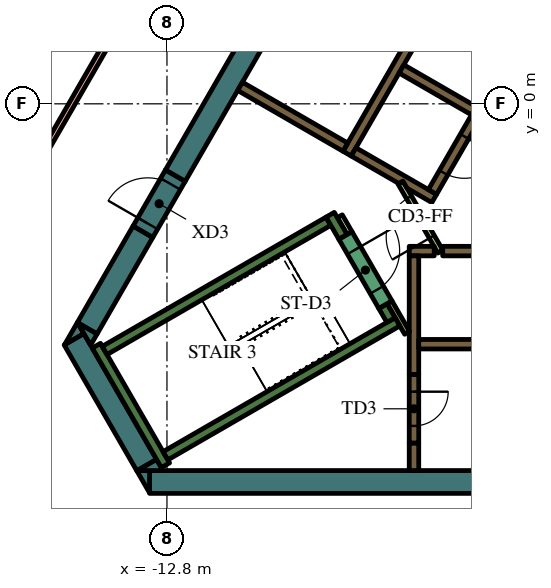
"""IFC4 building model, lengths in metres.
Left out: names, types, materials, properties, quantities, classifications, styles, units other than length and angle.
Written with IfcOpenShell. Run it as: python <this file> out.ifc"""

import sys

from ifc_helpers import new_model, si_unit, direction, frame, frame_2d, origin, place, context, subcontext, project, spatial, polyline, rectangle, outline, extrude, element, fill, save


model = new_model("IFC4")
c1 = context("Model", 3, precision=1e-05, world=origin(), true_north=direction((0.0, 1.0)))
c2 = subcontext(c1, "Body", "Model", "MODEL_VIEW")
j1 = project(units=[si_unit("LENGTHUNIT", "METRE"), si_unit("PLANEANGLEUNIT", "RADIAN")], contexts=[c1])
p1 = place(None, origin())
s1 = spatial("IfcSite", under=j1, at=p1, CompositionType="ELEMENT")
p2 = place(p1, origin())
s2 = spatial("IfcBuilding", under=s1, at=p2, CompositionType="ELEMENT")
p3 = place(p2, frame((0.0, 0.0, 321.6)))
s3 = spatial("IfcBuildingStorey", under=s2, at=p3, CompositionType="ELEMENT", Elevation=321.6)
p4 = place(p3, frame((8.904, -9.95, 0.0), z_axis=(0.0, 0.0, 1.0), x_axis=(-1.0, 0.0, 0.0)))
e1 = element("IfcWall", 1, at=p4, inside=s3, PredefinedType="SOLIDWALL", context=c2, shape_type="SweptSolid", body=[
    extrude(rectangle(XDim=22.161, YDim=0.6, at=frame_2d((11.081, 0.0))), origin(), (0.0, 0.0, 1.0), 6.0),
])
p5 = place(p3, origin())
e2 = element("IfcWall", 2, at=p5, inside=s3, PredefinedType="SOLIDWALL", context=c2, shape_type="SweptSolid", body=[
    extrude(outline(polyline([(-13.597, -9.65), (-13.259, -9.65), (-13.259, -10.236), (-13.597, -9.65)])), origin(), (0.0, 0.0, 1.0), 6.0),
])
p6 = place(p3, frame((-13.333, -9.506, 0.0), z_axis=(0.0, 0.0, 1.0), x_axis=(-0.500019073792, 0.866014391245, 0.0)))
e3 = element("IfcWall", 3, at=p6, inside=s3, PredefinedType="SOLIDWALL", context=c2, shape_type="SweptSolid", body=[
    extrude(rectangle(XDim=3.823, YDim=0.6, at=frame_2d((1.912, 0.0))), origin(), (0.0, 0.0, 1.0), 6.0),
])
e4 = element("IfcWall", 4, at=p5, inside=s3, PredefinedType="SOLIDWALL", context=c2, shape_type="SweptSolid", body=[
    extrude(outline(polyline([(-14.987, -6.043), (-15.493, -6.335), (-15.156, -5.75), (-14.987, -6.043)])), origin(), (0.0, 0.0, 1.0), 6.0),
])
e5 = element("IfcWall", 5, at=p5, inside=s3, PredefinedType="SOLIDWALL", context=c2, shape_type="SweptSolid", body=[
    extrude(outline(polyline([(-12.904, -9.65), (-13.58, -9.65), (-13.073, -9.357), (-12.904, -9.65)])), origin(), (0.0, 0.0, 1.0), 6.0),
])
p7 = place(p3, frame((-13.432, -3.364, 0.0), z_axis=(0.0, 0.0, 1.0), x_axis=(-0.499960127962, -0.866048422692, 0.0)))
e6 = element("IfcWall", 6, at=p7, inside=s3, PredefinedType="SOLIDWALL", context=c2, shape_type="SweptSolid", body=[
    extrude(rectangle(XDim=2.934, YDim=0.6, at=frame_2d((1.467, 0.0))), origin(), (0.0, 0.0, 1.0), 6.0),
])
e7 = element("IfcWall", 7, at=p5, inside=s3, PredefinedType="SOLIDWALL", context=c2, shape_type="SweptSolid", body=[
    extrude(outline(polyline([(-14.809, -6.35), (-15.147, -5.764), (-14.64, -6.057), (-14.809, -6.35)])), origin(), (0.0, 0.0, 1.0), 6.0),
])
p8 = place(p3, frame((-4.652, 11.842, 0.0), z_axis=(0.0, 0.0, 1.0), x_axis=(-0.500003640647, -0.866023301845, 0.0)))
e8 = element("IfcWall", 8, at=p8, inside=s3, PredefinedType="SOLIDWALL", context=c2, shape_type="SweptSolid", body=[
    extrude(rectangle(XDim=15.858, YDim=0.6, at=frame_2d((7.929, 0.0))), origin(), (0.0, 0.0, 1.0), 6.0),
])
p9 = place(p3, frame((-12.84, -9.511, 0.0), z_axis=(0.0, 0.0, 1.0), x_axis=(-0.499997733992, 0.866026712061, 0.0)))
e9 = element("IfcWall", 9, at=p9, inside=s3, PredefinedType="SOLIDWALL", context=c2, shape_type="SweptSolid", body=[
    extrude(rectangle(XDim=3.634, YDim=0.25, at=frame_2d((1.817, 0.0))), origin(), (0.0, 0.0, 1.0), 6.0),
])
p10 = place(p3, frame((-14.44, -6.49, 0.0), z_axis=(0.0, 0.0, 1.0), x_axis=(0.866022966069, 0.500004222222, 0.0)))
e10 = element("IfcWall", 10, at=p10, inside=s3, PredefinedType="SOLIDWALL", context=c2, shape_type="SweptSolid", body=[
    extrude(rectangle(XDim=6.8, YDim=0.25, at=frame_2d((3.4, 0.0))), origin(), (0.0, 0.0, 1.0), 6.0),
])
p11 = place(p3, frame((-8.168, -3.503, 0.0), z_axis=(0.0, 0.0, 1.0), x_axis=(-0.499952099219, 0.866053057547, 0.0)))
e11 = element("IfcWall", 11, at=p11, inside=s3, PredefinedType="SOLIDWALL", context=c2, shape_type="SweptSolid", body=[
    extrude(rectangle(XDim=0.675, YDim=0.25, at=frame_2d((0.337, 0.0))), origin(), (0.0, 0.0, 1.0), 6.0),
])
p12 = place(p3, frame((-12.84, -9.261, 0.0), z_axis=(0.0, 0.0, 1.0), x_axis=(0.866016039709, 0.500016218704, 0.0)))
e12 = element("IfcWall", 12, at=p12, inside=s3, PredefinedType="SOLIDWALL", context=c2, shape_type="SweptSolid", body=[
    extrude(rectangle(XDim=7.05, YDim=0.25, at=frame_2d((3.525, 0.0))), origin(), (0.0, 0.0, 1.0), 6.0),
])
p13 = place(p3, frame((-6.905, -5.69, 0.0), z_axis=(0.0, 0.0, 1.0), x_axis=(-0.500402024738, 0.865793170242, 0.0)))
e13 = element("IfcWall", 13, at=p13, inside=s3, PredefinedType="SOLIDWALL", context=c2, shape_type="SweptSolid", body=[
    extrude(rectangle(XDim=0.425, YDim=0.25, at=frame_2d((0.212, 0.0))), origin(), (0.0, 0.0, 1.0), 6.0),
])
p14 = place(p3, frame((-5.545, -3.875, 0.0), z_axis=(0.0, 0.0, 1.0), x_axis=(1.0, 0.0, 0.0)))
e14 = element("IfcWall", 14, at=p14, inside=s3, PredefinedType="SOLIDWALL", context=c2, shape_type="SweptSolid", body=[
    extrude(rectangle(XDim=11.97, YDim=0.25, at=frame_2d((5.985, 0.0))), origin(), (0.0, 0.0, 1.0), 6.0),
])
p15 = place(p3, frame((-6.425, -3.875, 0.0), z_axis=(0.0, 0.0, 1.0), x_axis=(1.0, 0.0, 0.0)))
e15 = element("IfcWall", 15, at=p15, inside=s3, PredefinedType="SOLIDWALL", context=c2, shape_type="SweptSolid", body=[
    extrude(rectangle(XDim=0.658, YDim=0.25, at=frame_2d((0.329, 0.0))), origin(), (0.0, 0.0, 1.0), 6.0),
])
p16 = place(p3, frame((-6.3, -7.125, 0.0), z_axis=(0.0, 0.0, 1.0), x_axis=(0.0, 1.0, 0.0)))
e16 = element("IfcWall", 16, at=p16, inside=s3, PredefinedType="SOLIDWALL", context=c2, shape_type="SweptSolid", body=[
    extrude(rectangle(XDim=3.125, YDim=0.25, at=frame_2d((1.562, 0.0))), origin(), (0.0, 0.0, 1.0), 6.0),
])
p17 = place(p3, frame((-6.3, -8.925, 0.0), z_axis=(0.0, 0.0, 1.0), x_axis=(0.0, -1.0, 0.0)))
e17 = element("IfcWall", 17, at=p17, inside=s3, PredefinedType="SOLIDWALL", context=c2, shape_type="SweptSolid", body=[
    extrude(rectangle(XDim=0.725, YDim=0.25, at=frame_2d((0.363, 0.0))), origin(), (0.0, 0.0, 1.0), 6.0),
])
p18 = place(p3, frame((-8.06, -1.311, 0.0), z_axis=(0.0, 0.0, 1.0), x_axis=(0.50000273126, 0.866023826885, 0.0)))
e18 = element("IfcWall", 18, at=p18, inside=s3, PredefinedType="SOLIDWALL", context=c2, shape_type="SweptSolid", body=[
    extrude(rectangle(XDim=10.33, YDim=0.25, at=frame_2d((5.165, 0.0))), origin(), (0.0, 0.0, 1.0), 6.0),
])
p19 = place(p3, frame((-4.724, -0.182, 0.0), z_axis=(0.0, 0.0, 1.0), x_axis=(-0.866008176907, 0.50002983664, 0.0)))
e19 = element("IfcWall", 19, at=p19, inside=s3, PredefinedType="SOLIDWALL", context=c2, shape_type="SweptSolid", body=[
    extrude(rectangle(XDim=2.2, YDim=0.25, at=frame_2d((1.1, 0.0))), origin(), (0.0, 0.0, 1.0), 6.0),
])
e20 = element("IfcWall", 20, at=p5, inside=s3, PredefinedType="SOLIDWALL", context=c2, shape_type="SweptSolid", body=[
    extrude(outline(polyline([(-5.922, -2.257), (-5.922, -2.257), (-5.705, -2.382), (-5.83, -2.598), (-6.483, -2.221), (-6.591, -2.033), (-6.591, -2.033), (-6.7, -2.096), (-7.952, -1.373), (-7.827, -1.156), (-5.922, -2.257)])), origin(), (0.0, 0.0, 1.0), 6.0),
])
p20 = place(p3, frame((-8.106, -1.14, 0.0), z_axis=(0.0, 0.0, 1.0), x_axis=(-0.866008981251, 0.500028443584, 0.0)))
e21 = element("IfcWall", 21, at=p20, inside=s3, PredefinedType="SOLIDWALL", context=c2, shape_type="SweptSolid", body=[
    extrude(rectangle(XDim=3.2, YDim=0.25, at=frame_2d((1.6, 0.0))), origin(), (0.0, 0.0, 1.0), 6.0),
])
p21 = place(p3, frame((-8.252, -2.958, 0.0), z_axis=(0.0, 0.0, 1.0), x_axis=(0.500174715838, -0.865924508047, 0.0)))
e22 = element("IfcWall", 22, at=p21, inside=s3, PredefinedType="PARTITIONING", context=c2, shape_type="SweptSolid", body=[
    extrude(rectangle(XDim=0.514, YDim=0.15, at=frame_2d((0.257, 0.0))), origin(), (0.0, 0.0, 1.0), 5.3),
])
p22 = place(p3, frame((-6.48, -6.027, 0.0), z_axis=(0.0, 0.0, 1.0), x_axis=(-0.499927229454, 0.866067413802, 0.0)))
e23 = element("IfcWall", 23, at=p22, inside=s3, PredefinedType="PARTITIONING", context=c2, shape_type="SweptSolid", body=[
    extrude(rectangle(XDim=0.929, YDim=0.15, at=frame_2d((0.464, 0.0))), origin(), (0.0, 0.0, 1.0), 6.0),
])
p23 = place(p3, frame((-6.175, -6.325, 0.0), z_axis=(0.0, 0.0, 1.0), x_axis=(1.0, 0.0, 0.0)))
e24 = element("IfcWall", 24, at=p23, inside=s3, PredefinedType="SOLIDWALL", context=c2, shape_type="SweptSolid", body=[
    extrude(rectangle(XDim=12.35, YDim=0.25, at=frame_2d((6.175, 0.0))), origin(), (0.0, 0.0, 1.0), 6.0),
])
p24 = place(p23, frame((3.205, 0.0, 0.0)))
e25 = element("IfcOpeningElement", 25, at=p24, cuts=e24, PredefinedType="OPENING", context=c2, shape_type="SweptSolid", body=[
    extrude(rectangle(XDim=0.9, YDim=2.1, at=frame_2d((0.45, 1.05))), frame((0.0, 0.135, 0.0), z_axis=(0.0, -1.0, 0.0), x_axis=(1.0, 0.0, 0.0)), (0.0, 0.0, 1.0), 0.27),
])
p25 = place(p23, frame((8.145, 0.0, 0.0)))
e26 = element("IfcOpeningElement", 26, at=p25, cuts=e24, PredefinedType="OPENING", context=c2, shape_type="SweptSolid", body=[
    extrude(rectangle(XDim=1.1, YDim=2.1, at=frame_2d((0.55, 1.05))), frame((0.0, 0.135, 0.0), z_axis=(0.0, -1.0, 0.0), x_axis=(1.0, 0.0, 0.0)), (0.0, 0.0, 1.0), 0.27),
])
p26 = place(p23, frame((10.665, 0.0, 0.0)))
e27 = element("IfcOpeningElement", 27, at=p26, cuts=e24, PredefinedType="OPENING", context=c2, shape_type="SweptSolid", body=[
    extrude(rectangle(XDim=1.1, YDim=2.1, at=frame_2d((0.55, 1.05))), frame((0.0, 0.135, 0.0), z_axis=(0.0, -1.0, 0.0), x_axis=(1.0, 0.0, 0.0)), (0.0, 0.0, 1.0), 0.27),
])
p27 = place(p3, frame((-0.898, 6.194, 0.0), z_axis=(0.0, 0.0, 1.0), x_axis=(-0.499996202215, -0.866027596426, 0.0)))
e28 = element("IfcWall", 28, at=p27, inside=s3, PredefinedType="SOLIDWALL", context=c2, shape_type="SweptSolid", body=[
    extrude(rectangle(XDim=9.83, YDim=0.25, at=frame_2d((4.915, 0.0))), origin(), (0.0, 0.0, 1.0), 6.0),
])
p28 = place(p27, frame((0.585, 0.0, 0.0)))
e29 = element("IfcOpeningElement", 29, at=p28, cuts=e28, PredefinedType="OPENING", context=c2, shape_type="SweptSolid", body=[
    extrude(rectangle(XDim=1.1, YDim=2.1, at=frame_2d((0.55, 1.05))), frame((0.0, 0.135, 0.0), z_axis=(0.0, -1.0, 0.0), x_axis=(1.0, 0.0, 0.0)), (0.0, 0.0, 1.0), 0.27),
])
p29 = place(p27, frame((3.105, 0.0, 0.0)))
e30 = element("IfcOpeningElement", 30, at=p29, cuts=e28, PredefinedType="OPENING", context=c2, shape_type="SweptSolid", body=[
    extrude(rectangle(XDim=1.1, YDim=2.1, at=frame_2d((0.55, 1.05))), frame((0.0, 0.135, 0.0), z_axis=(0.0, -1.0, 0.0), x_axis=(1.0, 0.0, 0.0)), (0.0, 0.0, 1.0), 0.27),
])
p30 = place(p27, frame((5.625, 0.0, 0.0)))
e31 = element("IfcOpeningElement", 31, at=p30, cuts=e28, PredefinedType="OPENING", context=c2, shape_type="SweptSolid", body=[
    extrude(rectangle(XDim=1.1, YDim=2.1, at=frame_2d((0.55, 1.05))), frame((0.0, 0.135, 0.0), z_axis=(0.0, -1.0, 0.0), x_axis=(1.0, 0.0, 0.0)), (0.0, 0.0, 1.0), 0.27),
])
p31 = place(p27, frame((8.145, 0.0, 0.0)))
e32 = element("IfcOpeningElement", 32, at=p31, cuts=e28, PredefinedType="OPENING", context=c2, shape_type="SweptSolid", body=[
    extrude(rectangle(XDim=1.1, YDim=2.1, at=frame_2d((0.55, 1.05))), frame((0.0, 0.135, 0.0), z_axis=(0.0, -1.0, 0.0), x_axis=(1.0, 0.0, 0.0)), (0.0, 0.0, 1.0), 0.27),
])
p32 = place(p3, frame((-8.103, -3.466, 0.0), z_axis=(0.0, 0.0, 1.0), x_axis=(0.500078061341, -0.865980330357, 0.0)))
e33 = element("IfcWall", 33, at=p32, inside=s3, PredefinedType="SOLIDWALL", context=c2, shape_type="SweptSolid", body=[
    extrude(rectangle(XDim=2.1, YDim=0.4, at=frame_2d((1.05, 0.0))), origin(), (0.0, 0.0, 1.0), 6.0),
])
p33 = place(p32, frame((0.45, 0.0, 0.0)))
e34 = element("IfcOpeningElement", 34, at=p33, cuts=e33, PredefinedType="OPENING", context=c2, shape_type="SweptSolid", body=[
    extrude(rectangle(XDim=1.2, YDim=2.1, at=frame_2d((0.6, 1.05))), frame((0.0, 0.21, 0.0), z_axis=(0.0, -1.0, 0.0), x_axis=(1.0, 0.0, 0.0)), (0.0, 0.0, 1.0), 0.42),
])
p34 = place(p3, frame((-6.3, -7.125, 0.0), z_axis=(0.0, 0.0, 1.0), x_axis=(0.0, -1.0, 0.0)))
e35 = element("IfcWall", 35, at=p34, inside=s3, PredefinedType="SOLIDWALL", context=c2, shape_type="SweptSolid", body=[
    extrude(rectangle(XDim=1.8, YDim=0.25, at=frame_2d((0.9, 0.0))), origin(), (0.0, 0.0, 1.0), 6.0),
])
p35 = place(p34, frame((0.45, 0.0, 0.0)))
e36 = element("IfcOpeningElement", 36, at=p35, cuts=e35, PredefinedType="OPENING", context=c2, shape_type="SweptSolid", body=[
    extrude(rectangle(XDim=0.9, YDim=2.1, at=frame_2d((0.45, 1.05))), frame((0.0, 0.135, 0.0), z_axis=(0.0, -1.0, 0.0), x_axis=(1.0, 0.0, 0.0)), (0.0, 0.0, 1.0), 0.27),
])
p36 = place(p3, frame((-5.606, -3.89, 0.0), z_axis=(0.0, 0.0, 1.0), x_axis=(-0.500027713859, 0.866009402589, 0.0)))
e37 = element("IfcWall", 37, at=p36, inside=s3, PredefinedType="PARTITIONING", context=c2, shape_type="SweptSolid", body=[
    extrude(rectangle(XDim=2.1, YDim=0.15, at=frame_2d((1.05, 0.0))), origin(), (0.0, 0.0, 1.0), 5.3),
])
p37 = place(p36, frame((0.45, 0.0, 0.0)))
e38 = element("IfcOpeningElement", 38, at=p37, cuts=e37, PredefinedType="OPENING", context=c2, shape_type="SweptSolid", body=[
    extrude(rectangle(XDim=1.2, YDim=2.1, at=frame_2d((0.6, 1.05))), frame((0.0, 0.085, 0.0), z_axis=(0.0, -1.0, 0.0), x_axis=(1.0, 0.0, 0.0)), (0.0, 0.0, 1.0), 0.17),
])
p38 = place(p3, frame((-13.432, -3.364, 0.0), z_axis=(0.0, 0.0, 1.0), x_axis=(0.500000056704, 0.866025371046, 0.0)))
e39 = element("IfcWall", 39, at=p38, inside=s3, PredefinedType="SOLIDWALL", context=c2, shape_type="SweptSolid", body=[
    extrude(rectangle(XDim=1.7, YDim=0.6, at=frame_2d((0.85, 0.0))), origin(), (0.0, 0.0, 1.0), 6.0),
])
p39 = place(p38, frame((0.25, 0.0, 0.0)))
e40 = element("IfcOpeningElement", 40, at=p39, cuts=e39, PredefinedType="OPENING", context=c2, shape_type="SweptSolid", body=[
    extrude(rectangle(XDim=1.2, YDim=2.1, at=frame_2d((0.6, 1.05))), frame((0.0, 0.31, 0.0), z_axis=(0.0, -1.0, 0.0), x_axis=(1.0, 0.0, 0.0)), (0.0, 0.0, 1.0), 0.62),
])
p40 = place(p3, frame((-3.984, 19.6, 0.0), z_axis=(0.0, 0.0, 1.0), x_axis=(-0.500001742692, -0.866024397638, 0.0)))
e41 = element("IfcWall", 41, at=p40, inside=s3, PredefinedType="PARTITIONING", context=c2, shape_type="SweptSolid", body=[
    extrude(rectangle(XDim=29.965, YDim=0.15, at=frame_2d((14.982, 0.0))), origin(), (0.0, 0.0, 1.0), 5.3),
])
p41 = place(p40, frame((14.082, 0.0, 0.0)))
e42 = element("IfcOpeningElement", 42, at=p41, cuts=e41, PredefinedType="OPENING", context=c2, shape_type="SweptSolid", body=[
    extrude(rectangle(XDim=1.8, YDim=2.1, at=frame_2d((0.9, 1.05))), frame((0.0, 0.085, 0.0), z_axis=(0.0, -1.0, 0.0), x_axis=(1.0, 0.0, 0.0)), (0.0, 0.0, 1.0), 0.17),
])
p42 = place(p40, frame((9.894, 0.0, 0.0)))
e43 = element("IfcOpeningElement", 43, at=p42, cuts=e41, PredefinedType="OPENING", context=c2, shape_type="SweptSolid", body=[
    extrude(rectangle(XDim=1.8, YDim=2.1, at=frame_2d((0.9, 1.05))), frame((0.0, 0.085, 0.0), z_axis=(0.0, -1.0, 0.0), x_axis=(1.0, 0.0, 0.0)), (0.0, 0.0, 1.0), 0.17),
])
p43 = place(p31, origin())
e44 = element("IfcDoor", 44, at=p43, inside=s3, OperationType="DOUBLE_DOOR_SLIDING", PredefinedType="DOOR", context=c2, shape_type="SweptSolid", body=[
    extrude(rectangle(XDim=1.1, YDim=2.1, at=frame_2d((0.55, 1.05))), frame((0.0, 0.025, 0.0), z_axis=(0.0, -1.0, 0.0), x_axis=(1.0, 0.0, 0.0)), (0.0, 0.0, 1.0), 0.05),
])
fill(e32, e44)
p44 = place(p33, origin())
e45 = element("IfcDoor", 45, at=p44, inside=s3, OperationType="SINGLE_SWING_LEFT", PredefinedType="DOOR", context=c2, shape_type="SweptSolid", body=[
    extrude(rectangle(XDim=1.2, YDim=2.1, at=frame_2d((0.6, 1.05))), frame((0.0, 0.025, 0.0), z_axis=(0.0, -1.0, 0.0), x_axis=(1.0, 0.0, 0.0)), (0.0, 0.0, 1.0), 0.05),
])
fill(e34, e45)
p45 = place(p35, origin())
e46 = element("IfcDoor", 46, at=p45, inside=s3, OperationType="SINGLE_SWING_LEFT", PredefinedType="DOOR", context=c2, shape_type="SweptSolid", body=[
    extrude(rectangle(XDim=0.9, YDim=2.1, at=frame_2d((0.45, 1.05))), frame((0.0, 0.025, 0.0), z_axis=(0.0, -1.0, 0.0), x_axis=(1.0, 0.0, 0.0)), (0.0, 0.0, 1.0), 0.05),
])
fill(e36, e46)
p46 = place(p37, origin())
e47 = element("IfcDoor", 47, at=p46, inside=s3, OperationType="SINGLE_SWING_LEFT", PredefinedType="DOOR", context=c2, shape_type="SweptSolid", body=[
    extrude(rectangle(XDim=1.2, YDim=2.1, at=frame_2d((0.6, 1.05))), frame((0.0, 0.025, 0.0), z_axis=(0.0, -1.0, 0.0), x_axis=(1.0, 0.0, 0.0)), (0.0, 0.0, 1.0), 0.05),
])
fill(e38, e47)
p47 = place(p39, origin())
e48 = element("IfcDoor", 48, at=p47, inside=s3, OperationType="SINGLE_SWING_LEFT", PredefinedType="DOOR", context=c2, shape_type="SweptSolid", body=[
    extrude(rectangle(XDim=1.2, YDim=2.1, at=frame_2d((0.6, 1.05))), frame((0.0, 0.025, 0.0), z_axis=(0.0, -1.0, 0.0), x_axis=(1.0, 0.0, 0.0)), (0.0, 0.0, 1.0), 0.05),
])
fill(e40, e48)
save(model, sys.argv[1])
